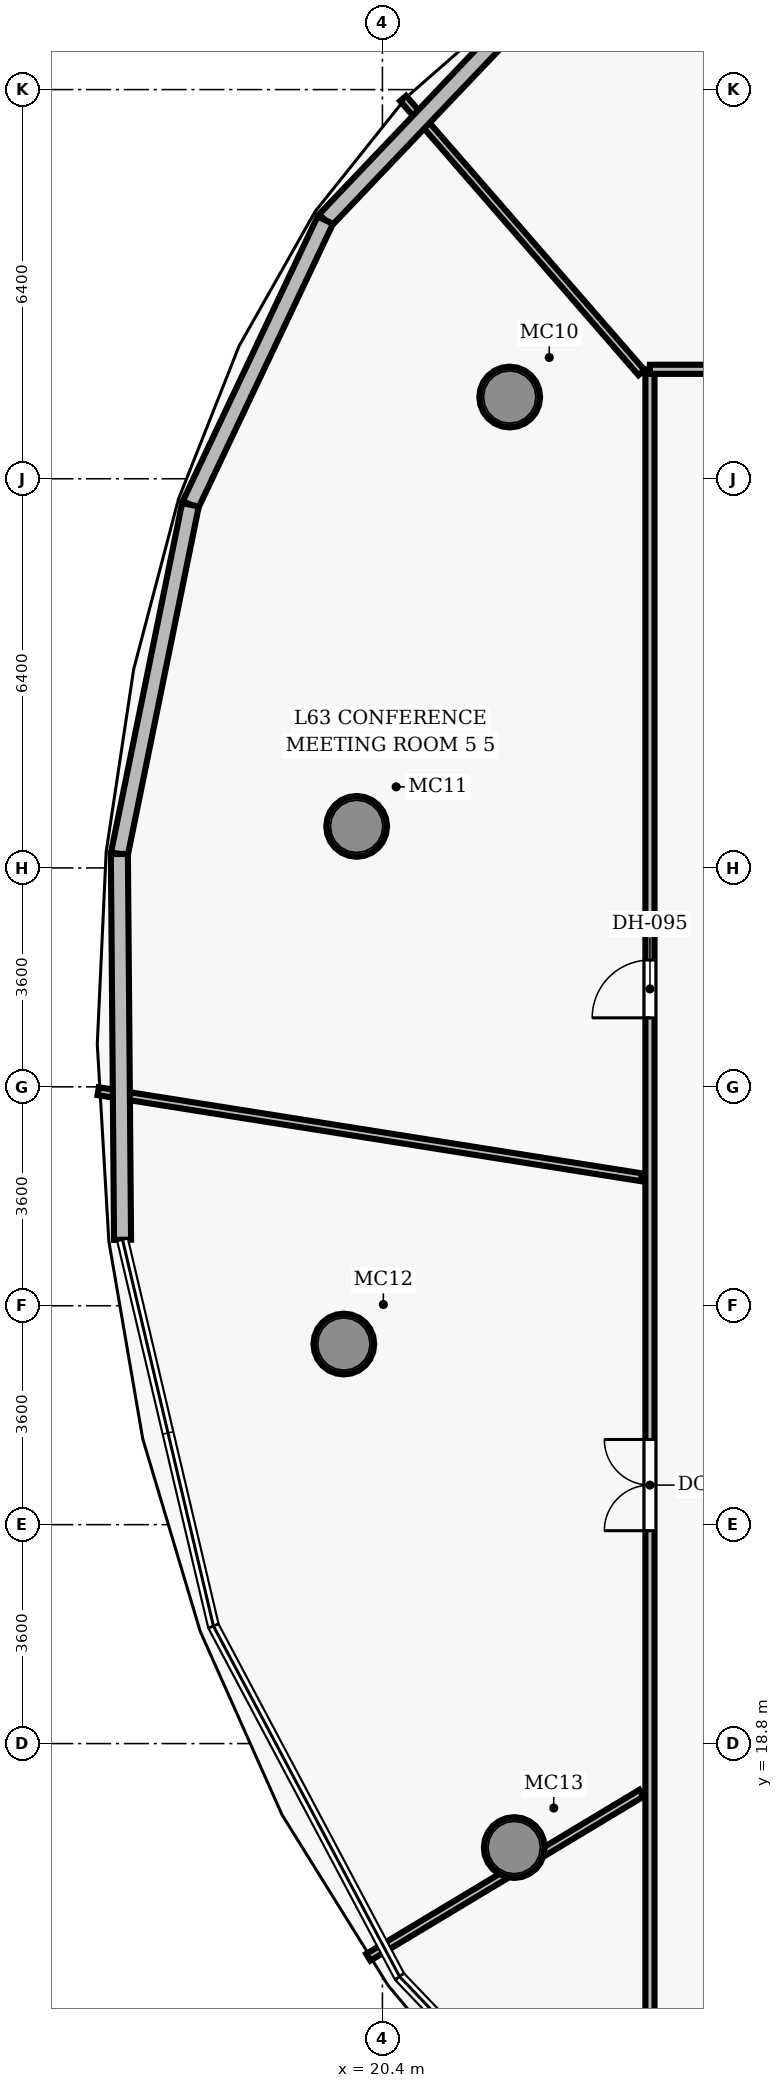
"""IFC4 building model, lengths in metres.
Left out: names, types, materials, properties, quantities, classifications, styles, units other than length and angle.
Written with IfcOpenShell. Run it as: python <this file> out.ifc"""

import sys

from ifc_helpers import new_model, si_unit, direction, frame, frame_2d, origin, origin_2d, place, context, subcontext, project, spatial, rectangle, hollow_circle, extrude, element, fill, save


model = new_model("IFC4")
c1 = context("Model", 3, precision=1e-05, world=origin(), true_north=direction((0.0, 1.0)))
c2 = subcontext(c1, "Body", "Model", "MODEL_VIEW")
j1 = project(units=[si_unit("LENGTHUNIT", "METRE"), si_unit("PLANEANGLEUNIT", "RADIAN")], contexts=[c1])
p1 = place(None, origin())
s1 = spatial("IfcSite", under=j1, at=p1, CompositionType="ELEMENT")
p2 = place(p1, origin())
s2 = spatial("IfcBuilding", under=s1, at=p2, CompositionType="ELEMENT")
p3 = place(p2, frame((0.0, 0.0, 249.75)))
s3 = spatial("IfcBuildingStorey", under=s2, at=p3, CompositionType="ELEMENT", Elevation=249.75)
for number, where, z_axis, x_axis in (
    (1, (22.494, 40.944, 0.0), (0.0, 0.0, 1.0), (1.0, 0.0, 0.0)),
    (2, (19.976, 33.884, 0.0), (0.0, 0.0, 1.0), (1.0, 0.0, 0.0)),
    (3, (19.765, 25.371, 0.0), (0.0, 0.0, 1.0), (1.0, 0.0, 0.0)),
    (4, (22.567, 17.09, 0.0), (0.0, 0.0, 1.0), (1.0, 0.0, 0.0)),
):
    element("IfcColumn", number, at=place(p3, frame(where, z_axis=z_axis, x_axis=x_axis)), inside=s3, PredefinedType="COLUMN", context=c2, shape_type="SweptSolid", body=[
        extrude(hollow_circle(Radius=0.5, WallThickness=0.045, at=origin_2d()), origin(), (0.0, 0.0, 1.0), 3.85),
    ])
p4 = place(p3, frame((24.8, 11.306, 0.0), z_axis=(0.0, 0.0, 1.0), x_axis=(0.0, 1.0, 0.0)))
e5 = element("IfcWall", 5, at=p4, inside=s3, PredefinedType="PARTITIONING", context=c2, shape_type="SweptSolid", body=[
    extrude(rectangle(XDim=30.094, YDim=0.15, at=frame_2d((15.047, 0.0))), origin(), (0.0, 0.0, 1.0), 3.04),
])
p5 = place(p4, frame((19.429, 0.0, 0.0)))
e6 = element("IfcOpeningElement", 6, at=p5, cuts=e5, PredefinedType="OPENING", context=c2, shape_type="SweptSolid", body=[
    extrude(rectangle(XDim=0.95, YDim=2.15, at=frame_2d((0.475, 1.075))), frame((0.0, 0.085, 0.0), z_axis=(0.0, -1.0, 0.0), x_axis=(1.0, 0.0, 0.0)), (0.0, 0.0, 1.0), 0.17),
])
p6 = place(p4, frame((10.994, 0.0, 0.0)))
e7 = element("IfcOpeningElement", 7, at=p6, cuts=e5, PredefinedType="OPENING", context=c2, shape_type="SweptSolid", body=[
    extrude(rectangle(XDim=1.5, YDim=2.2, at=frame_2d((0.75, 1.1))), frame((0.0, 0.085, 0.0), z_axis=(0.0, -1.0, 0.0), x_axis=(1.0, 0.0, 0.0)), (0.0, 0.0, 1.0), 0.17),
])
p7 = place(p3, frame((24.8, 41.4, 0.0), z_axis=(0.0, 0.0, 1.0), x_axis=(1.0, 0.0, 0.0)))
e8 = element("IfcWall", 8, at=p7, inside=s3, PredefinedType="PARTITIONING", context=c2, shape_type="SweptSolid", body=[
    extrude(rectangle(XDim=2.1, YDim=0.15, at=frame_2d((1.05, 0.0))), origin(), (0.0, 0.0, 1.0), 3.04),
])
p8 = place(p3, frame((24.66, 41.346, 0.0), z_axis=(0.0, 0.0, 1.0), x_axis=(-0.656059320553, 0.754709326771, 0.0)))
e9 = element("IfcWall", 9, at=p8, inside=s3, PredefinedType="PARTITIONING", context=c2, shape_type="SweptSolid", body=[
    extrude(rectangle(XDim=5.974, YDim=0.13, at=frame_2d((2.987, 0.0))), origin(), (0.0, 0.0, 1.0), 3.04),
])
p9 = place(p3, frame((24.66, 28.113, 0.0), z_axis=(0.0, 0.0, 1.0), x_axis=(-0.987685158581, 0.156454554167, 0.0)))
e10 = element("IfcWall", 10, at=p9, inside=s3, PredefinedType="PARTITIONING", context=c2, shape_type="SweptSolid", body=[
    extrude(rectangle(XDim=9.046, YDim=0.13, at=frame_2d((4.523, 0.0))), origin(), (0.0, 0.0, 1.0), 3.04),
])
p10 = place(p3, frame((24.66, 17.985, 0.0), z_axis=(0.0, 0.0, 1.0), x_axis=(-0.857155707128, -0.515057369366, 0.0)))
e11 = element("IfcWall", 11, at=p10, inside=s3, PredefinedType="PARTITIONING", context=c2, shape_type="SweptSolid", body=[
    extrude(rectangle(XDim=5.241, YDim=0.13, at=frame_2d((2.621, 0.0))), origin(), (0.0, 0.0, 1.0), 3.04),
])
p11 = place(p3, frame((19.46, 43.853, 0.0), z_axis=(0.0, 0.0, 1.0), x_axis=(0.68967745757, 0.724116706422, 0.0)))
e12 = element("IfcWall", 12, at=p11, inside=s3, PredefinedType="SOLIDWALL", context=c2, shape_type="SweptSolid", body=[
    extrude(rectangle(XDim=4.65, YDim=0.28, at=frame_2d((2.325, 0.0))), origin(), (0.0, 0.0, 1.0), 3.625),
])
p12 = place(p3, frame((17.243, 39.172, 0.0), z_axis=(0.0, 0.0, 1.0), x_axis=(0.428068107667, 0.903746477281, 0.0)))
e13 = element("IfcWall", 13, at=p12, inside=s3, PredefinedType="SOLIDWALL", context=c2, shape_type="SweptSolid", body=[
    extrude(rectangle(XDim=5.179, YDim=0.28, at=frame_2d((2.59, 0.0))), origin(), (0.0, 0.0, 1.0), 3.625),
])
p13 = place(p3, frame((16.074, 33.43, 0.0), z_axis=(0.0, 0.0, 1.0), x_axis=(0.199471884584, 0.979903549979, 0.0)))
e14 = element("IfcWall", 14, at=p13, inside=s3, PredefinedType="SOLIDWALL", context=c2, shape_type="SweptSolid", body=[
    extrude(rectangle(XDim=5.86, YDim=0.28, at=frame_2d((2.93, 0.0))), origin(), (0.0, 0.0, 1.0), 3.625),
])
p14 = place(p3, frame((16.126, 27.085, 0.0), z_axis=(0.0, 0.0, 1.0), x_axis=(-0.008233973814, 0.999966100263, 0.0)))
e15 = element("IfcWall", 15, at=p14, inside=s3, PredefinedType="SOLIDWALL", context=c2, shape_type="SweptSolid", body=[
    extrude(rectangle(XDim=6.345, YDim=0.28, at=frame_2d((3.173, 0.0))), origin(), (0.0, 0.0, 1.0), 3.625),
])
p15 = place(p5, origin())
e16 = element("IfcDoor", 16, at=p15, inside=s3, OperationType="SINGLE_SWING_LEFT", PredefinedType="DOOR", context=c2, shape_type="SweptSolid", body=[
    extrude(rectangle(XDim=0.95, YDim=2.15, at=frame_2d((0.475, 1.075))), frame((0.0, 0.025, 0.0), z_axis=(0.0, -1.0, 0.0), x_axis=(1.0, 0.0, 0.0)), (0.0, 0.0, 1.0), 0.05),
])
fill(e6, e16)
p16 = place(p6, origin())
e17 = element("IfcDoor", 17, at=p16, inside=s3, OperationType="DOUBLE_DOOR_SINGLE_SWING", PredefinedType="DOOR", context=c2, shape_type="SweptSolid", body=[
    extrude(rectangle(XDim=1.5, YDim=2.2, at=frame_2d((0.75, 1.1))), frame((0.0, 0.025, 0.0), z_axis=(0.0, -1.0, 0.0), x_axis=(1.0, 0.0, 0.0)), (0.0, 0.0, 1.0), 0.05),
])
fill(e7, e17)
save(model, sys.argv[1])
